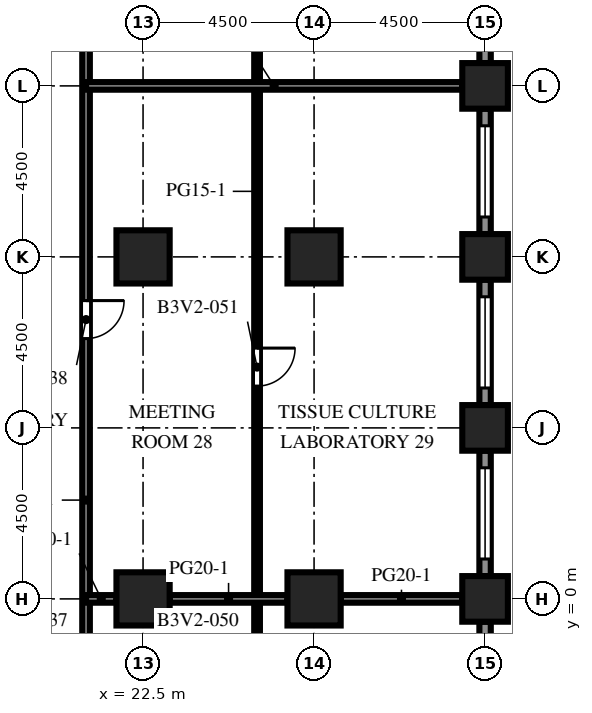
"""IFC4 building model, lengths in metres.
Left out: names, types, materials, properties, quantities, classifications, styles, units other than length and angle.
Written with IfcOpenShell. Run it as: python <this file> out.ifc"""

import sys

from ifc_helpers import new_model, si_unit, direction, frame, frame_2d, origin, origin_2d, place, context, subcontext, project, spatial, rectangle, extrude, element, fill, save


model = new_model("IFC4")
c1 = context("Model", 3, precision=1e-05, world=origin(), true_north=direction((0.0, 1.0)))
c2 = subcontext(c1, "Body", "Model", "MODEL_VIEW")
j1 = project(units=[si_unit("LENGTHUNIT", "METRE"), si_unit("PLANEANGLEUNIT", "RADIAN")], contexts=[c1])
p1 = place(None, origin())
s1 = spatial("IfcSite", under=j1, at=p1, CompositionType="ELEMENT")
p2 = place(p1, origin())
s2 = spatial("IfcBuilding", under=s1, at=p2, CompositionType="ELEMENT")
p3 = place(p2, frame((0.0, 0.0, 98.4)))
s3 = spatial("IfcBuildingStorey", under=s2, at=p3, CompositionType="ELEMENT", Elevation=98.4)
for number, where, z_axis, x_axis in (
    (1, (31.5, 0.0, 0.0), (0.0, 0.0, 1.0), (1.0, 0.0, 0.0)),
    (2, (31.5, 4.5, 0.0), (0.0, 0.0, 1.0), (1.0, 0.0, 0.0)),
    (3, (31.5, 9.0, 0.0), (0.0, 0.0, 1.0), (1.0, 0.0, 0.0)),
    (4, (31.5, 13.5, 0.0), (0.0, 0.0, 1.0), (1.0, 0.0, 0.0)),
):
    element("IfcColumn", number, at=place(p3, frame(where, z_axis=z_axis, x_axis=x_axis)), inside=s3, PredefinedType="COLUMN", context=c2, shape_type="SweptSolid", body=[
        extrude(rectangle(XDim=1.2, YDim=1.2, at=origin_2d()), origin(), (0.0, 0.0, 1.0), 4.1),
    ])
for number, where, z_axis, x_axis in (
    (5, (22.5, 0.0, 0.0), (0.0, 0.0, 1.0), (1.0, 0.0, 0.0)),
    (6, (22.5, 9.0, 0.0), (0.0, 0.0, 1.0), (1.0, 0.0, 0.0)),
    (7, (27.0, 0.0, 0.0), (0.0, 0.0, 1.0), (1.0, 0.0, 0.0)),
    (8, (27.0, 9.0, 0.0), (0.0, 0.0, 1.0), (1.0, 0.0, 0.0)),
):
    element("IfcColumn", number, at=place(p3, frame(where, z_axis=z_axis, x_axis=x_axis)), inside=s3, PredefinedType="COLUMN", context=c2, shape_type="SweptSolid", body=[
        extrude(rectangle(XDim=1.4, YDim=1.4, at=origin_2d()), origin(), (0.0, 0.0, 1.0), 4.1),
    ])
p4 = place(p3, frame((31.5, -0.6, 0.0), z_axis=(0.0, 0.0, 1.0), x_axis=(0.0, -1.0, 0.0)))
e9 = element("IfcWall", 9, at=p4, inside=s3, PredefinedType="SOLIDWALL", context=c2, shape_type="SweptSolid", body=[
    extrude(rectangle(XDim=3.3, YDim=0.3, at=frame_2d((1.65, 0.0))), origin(), (0.0, 0.0, 1.0), 2.75),
])
p5 = place(p4, frame((0.45, 0.0, 0.8)))
e10 = element("IfcOpeningElement", 10, at=p5, cuts=e9, PredefinedType="OPENING", context=c2, shape_type="SweptSolid", body=[
    extrude(rectangle(XDim=2.4, YDim=1.7, at=frame_2d((1.2, 0.85))), frame((0.0, 0.16, 0.0), z_axis=(0.0, -1.0, 0.0), x_axis=(1.0, 0.0, 0.0)), (0.0, 0.0, 1.0), 0.32),
])
p6 = place(p3, frame((31.5, 3.9, 0.0), z_axis=(0.0, 0.0, 1.0), x_axis=(0.0, -1.0, 0.0)))
e11 = element("IfcWall", 11, at=p6, inside=s3, PredefinedType="SOLIDWALL", context=c2, shape_type="SweptSolid", body=[
    extrude(rectangle(XDim=3.3, YDim=0.3, at=frame_2d((1.65, 0.0))), origin(), (0.0, 0.0, 1.0), 2.75),
])
p7 = place(p6, frame((0.45, 0.0, 0.8)))
e12 = element("IfcOpeningElement", 12, at=p7, cuts=e11, PredefinedType="OPENING", context=c2, shape_type="SweptSolid", body=[
    extrude(rectangle(XDim=2.4, YDim=1.7, at=frame_2d((1.2, 0.85))), frame((0.0, 0.16, 0.0), z_axis=(0.0, -1.0, 0.0), x_axis=(1.0, 0.0, 0.0)), (0.0, 0.0, 1.0), 0.32),
])
p8 = place(p3, frame((31.5, 8.4, 0.0), z_axis=(0.0, 0.0, 1.0), x_axis=(0.0, -1.0, 0.0)))
e13 = element("IfcWall", 13, at=p8, inside=s3, PredefinedType="SOLIDWALL", context=c2, shape_type="SweptSolid", body=[
    extrude(rectangle(XDim=3.3, YDim=0.3, at=frame_2d((1.65, 0.0))), origin(), (0.0, 0.0, 1.0), 2.75),
])
p9 = place(p8, frame((0.45, 0.0, 0.8)))
e14 = element("IfcOpeningElement", 14, at=p9, cuts=e13, PredefinedType="OPENING", context=c2, shape_type="SweptSolid", body=[
    extrude(rectangle(XDim=2.4, YDim=1.7, at=frame_2d((1.2, 0.85))), frame((0.0, 0.16, 0.0), z_axis=(0.0, -1.0, 0.0), x_axis=(1.0, 0.0, 0.0)), (0.0, 0.0, 1.0), 0.32),
])
p10 = place(p3, frame((31.5, 12.9, 0.0), z_axis=(0.0, 0.0, 1.0), x_axis=(0.0, -1.0, 0.0)))
e15 = element("IfcWall", 15, at=p10, inside=s3, PredefinedType="SOLIDWALL", context=c2, shape_type="SweptSolid", body=[
    extrude(rectangle(XDim=3.3, YDim=0.3, at=frame_2d((1.65, 0.0))), origin(), (0.0, 0.0, 1.0), 2.75),
])
p11 = place(p10, frame((0.45, 0.0, 0.8)))
e16 = element("IfcOpeningElement", 16, at=p11, cuts=e15, PredefinedType="OPENING", context=c2, shape_type="SweptSolid", body=[
    extrude(rectangle(XDim=2.4, YDim=1.7, at=frame_2d((1.2, 0.85))), frame((0.0, 0.16, 0.0), z_axis=(0.0, -1.0, 0.0), x_axis=(1.0, 0.0, 0.0)), (0.0, 0.0, 1.0), 0.32),
])
p12 = place(p3, frame((31.5, 17.4, 0.0), z_axis=(0.0, 0.0, 1.0), x_axis=(0.0, -1.0, 0.0)))
e17 = element("IfcWall", 17, at=p12, inside=s3, PredefinedType="SOLIDWALL", context=c2, shape_type="SweptSolid", body=[
    extrude(rectangle(XDim=3.3, YDim=0.3, at=frame_2d((1.65, 0.0))), origin(), (0.0, 0.0, 1.0), 2.75),
])
p13 = place(p12, frame((0.45, 0.0, 0.8)))
e18 = element("IfcOpeningElement", 18, at=p13, cuts=e17, PredefinedType="OPENING", context=c2, shape_type="SweptSolid", body=[
    extrude(rectangle(XDim=2.4, YDim=1.7, at=frame_2d((1.2, 0.85))), frame((0.0, 0.16, 0.0), z_axis=(0.0, -1.0, 0.0), x_axis=(1.0, 0.0, 0.0)), (0.0, 0.0, 1.0), 0.32),
])
p14 = place(p3, frame((21.0, 31.35, 0.0), z_axis=(0.0, 0.0, 1.0), x_axis=(0.0, -1.0, 0.0)))
e19 = element("IfcWall", 19, at=p14, inside=s3, PredefinedType="PARTITIONING", context=c2, shape_type="SweptSolid", body=[
    extrude(rectangle(XDim=53.7, YDim=0.2, at=frame_2d((26.85, 0.0))), origin(), (0.0, 0.0, 1.0), 3.65),
])
p15 = place(p14, frame((50.5, 0.0, 0.0)))
e20 = element("IfcOpeningElement", 20, at=p15, cuts=e19, PredefinedType="OPENING", context=c2, shape_type="SweptSolid", body=[
    extrude(rectangle(XDim=1.0, YDim=2.1, at=frame_2d((0.5, 1.05))), frame((0.0, 0.11, 0.0), z_axis=(0.0, -1.0, 0.0), x_axis=(1.0, 0.0, 0.0)), (0.0, 0.0, 1.0), 0.22),
])
p16 = place(p14, frame((46.5, 0.0, 0.0)))
e21 = element("IfcOpeningElement", 21, at=p16, cuts=e19, PredefinedType="OPENING", context=c2, shape_type="SweptSolid", body=[
    extrude(rectangle(XDim=1.0, YDim=2.1, at=frame_2d((0.5, 1.05))), frame((0.0, 0.11, 0.0), z_axis=(0.0, -1.0, 0.0), x_axis=(1.0, 0.0, 0.0)), (0.0, 0.0, 1.0), 0.22),
])
p17 = place(p14, frame((38.5, 0.0, 0.0)))
e22 = element("IfcOpeningElement", 22, at=p17, cuts=e19, PredefinedType="OPENING", context=c2, shape_type="SweptSolid", body=[
    extrude(rectangle(XDim=1.0, YDim=2.1, at=frame_2d((0.5, 1.05))), frame((0.0, 0.11, 0.0), z_axis=(0.0, -1.0, 0.0), x_axis=(1.0, 0.0, 0.0)), (0.0, 0.0, 1.0), 0.22),
])
p18 = place(p14, frame((33.0, 0.0, 0.0)))
e23 = element("IfcOpeningElement", 23, at=p18, cuts=e19, PredefinedType="OPENING", context=c2, shape_type="SweptSolid", body=[
    extrude(rectangle(XDim=1.0, YDim=2.1, at=frame_2d((0.5, 1.05))), frame((0.0, 0.11, 0.0), z_axis=(0.0, -1.0, 0.0), x_axis=(1.0, 0.0, 0.0)), (0.0, 0.0, 1.0), 0.22),
])
p19 = place(p14, frame((23.5, 0.0, 0.0)))
e24 = element("IfcOpeningElement", 24, at=p19, cuts=e19, PredefinedType="OPENING", context=c2, shape_type="SweptSolid", body=[
    extrude(rectangle(XDim=1.0, YDim=2.1, at=frame_2d((0.5, 1.05))), frame((0.0, 0.11, 0.0), z_axis=(0.0, -1.0, 0.0), x_axis=(1.0, 0.0, 0.0)), (0.0, 0.0, 1.0), 0.22),
])
p20 = place(p14, frame((15.75, 0.0, 0.0)))
e25 = element("IfcOpeningElement", 25, at=p20, cuts=e19, PredefinedType="OPENING", context=c2, shape_type="SweptSolid", body=[
    extrude(rectangle(XDim=1.0, YDim=2.1, at=frame_2d((0.5, 1.05))), frame((0.0, 0.11, 0.0), z_axis=(0.0, -1.0, 0.0), x_axis=(1.0, 0.0, 0.0)), (0.0, 0.0, 1.0), 0.22),
])
p21 = place(p14, frame((7.0, 0.0, 0.0)))
e26 = element("IfcOpeningElement", 26, at=p21, cuts=e19, PredefinedType="OPENING", context=c2, shape_type="SweptSolid", body=[
    extrude(rectangle(XDim=1.0, YDim=2.1, at=frame_2d((0.5, 1.05))), frame((0.0, 0.11, 0.0), z_axis=(0.0, -1.0, 0.0), x_axis=(1.0, 0.0, 0.0)), (0.0, 0.0, 1.0), 0.22),
])
p22 = place(p14, frame((1.0, 0.0, 0.0)))
e27 = element("IfcOpeningElement", 27, at=p22, cuts=e19, PredefinedType="OPENING", context=c2, shape_type="SweptSolid", body=[
    extrude(rectangle(XDim=1.0, YDim=2.1, at=frame_2d((0.5, 1.05))), frame((0.0, 0.11, 0.0), z_axis=(0.0, -1.0, 0.0), x_axis=(1.0, 0.0, 0.0)), (0.0, 0.0, 1.0), 0.22),
])
p23 = place(p3, frame((25.5, 31.35, 0.0), z_axis=(0.0, 0.0, 1.0), x_axis=(0.0, -1.0, 0.0)))
e28 = element("IfcWall", 28, at=p23, inside=s3, PredefinedType="PARTITIONING", context=c2, shape_type="SweptSolid", body=[
    extrude(rectangle(XDim=53.7, YDim=0.15, at=frame_2d((26.85, 0.0))), origin(), (0.0, 0.0, 1.0), 3.65),
])
p24 = place(p23, frame((50.5, 0.0, 0.0)))
e29 = element("IfcOpeningElement", 29, at=p24, cuts=e28, PredefinedType="OPENING", context=c2, shape_type="SweptSolid", body=[
    extrude(rectangle(XDim=1.0, YDim=2.1, at=frame_2d((0.5, 1.05))), frame((0.0, 0.085, 0.0), z_axis=(0.0, -1.0, 0.0), x_axis=(1.0, 0.0, 0.0)), (0.0, 0.0, 1.0), 0.17),
])
p25 = place(p23, frame((46.25, 0.0, 0.0)))
e30 = element("IfcOpeningElement", 30, at=p25, cuts=e28, PredefinedType="OPENING", context=c2, shape_type="SweptSolid", body=[
    extrude(rectangle(XDim=1.0, YDim=2.1, at=frame_2d((0.5, 1.05))), frame((0.0, 0.085, 0.0), z_axis=(0.0, -1.0, 0.0), x_axis=(1.0, 0.0, 0.0)), (0.0, 0.0, 1.0), 0.17),
])
p26 = place(p23, frame((38.5, 0.0, 0.0)))
e31 = element("IfcOpeningElement", 31, at=p26, cuts=e28, PredefinedType="OPENING", context=c2, shape_type="SweptSolid", body=[
    extrude(rectangle(XDim=1.0, YDim=2.1, at=frame_2d((0.5, 1.05))), frame((0.0, 0.085, 0.0), z_axis=(0.0, -1.0, 0.0), x_axis=(1.0, 0.0, 0.0)), (0.0, 0.0, 1.0), 0.17),
])
p27 = place(p23, frame((33.0, 0.0, 0.0)))
e32 = element("IfcOpeningElement", 32, at=p27, cuts=e28, PredefinedType="OPENING", context=c2, shape_type="SweptSolid", body=[
    extrude(rectangle(XDim=1.0, YDim=2.1, at=frame_2d((0.5, 1.05))), frame((0.0, 0.085, 0.0), z_axis=(0.0, -1.0, 0.0), x_axis=(1.0, 0.0, 0.0)), (0.0, 0.0, 1.0), 0.17),
])
p28 = place(p23, frame((24.75, 0.0, 0.0)))
e33 = element("IfcOpeningElement", 33, at=p28, cuts=e28, PredefinedType="OPENING", context=c2, shape_type="SweptSolid", body=[
    extrude(rectangle(XDim=1.0, YDim=2.1, at=frame_2d((0.5, 1.05))), frame((0.0, 0.085, 0.0), z_axis=(0.0, -1.0, 0.0), x_axis=(1.0, 0.0, 0.0)), (0.0, 0.0, 1.0), 0.17),
])
p29 = place(p23, frame((15.5, 0.0, 0.0)))
e34 = element("IfcOpeningElement", 34, at=p29, cuts=e28, PredefinedType="OPENING", context=c2, shape_type="SweptSolid", body=[
    extrude(rectangle(XDim=1.0, YDim=2.1, at=frame_2d((0.5, 1.05))), frame((0.0, 0.085, 0.0), z_axis=(0.0, -1.0, 0.0), x_axis=(1.0, 0.0, 0.0)), (0.0, 0.0, 1.0), 0.17),
])
p30 = place(p23, frame((9.75, 0.0, 0.0)))
e35 = element("IfcOpeningElement", 35, at=p30, cuts=e28, PredefinedType="OPENING", context=c2, shape_type="SweptSolid", body=[
    extrude(rectangle(XDim=1.0, YDim=2.1, at=frame_2d((0.5, 1.05))), frame((0.0, 0.085, 0.0), z_axis=(0.0, -1.0, 0.0), x_axis=(1.0, 0.0, 0.0)), (0.0, 0.0, 1.0), 0.17),
])
p31 = place(p23, frame((1.5, 0.0, 0.0)))
e36 = element("IfcOpeningElement", 36, at=p31, cuts=e28, PredefinedType="OPENING", context=c2, shape_type="SweptSolid", body=[
    extrude(rectangle(XDim=1.0, YDim=2.1, at=frame_2d((0.5, 1.05))), frame((0.0, 0.085, 0.0), z_axis=(0.0, -1.0, 0.0), x_axis=(1.0, 0.0, 0.0)), (0.0, 0.0, 1.0), 0.17),
])
p32 = place(p3, frame((21.0, 0.0, 0.0), z_axis=(0.0, 0.0, 1.0), x_axis=(1.0, 0.0, 0.0)))
e37 = element("IfcWall", 37, at=p32, inside=s3, PredefinedType="PARTITIONING", context=c2, shape_type="SweptSolid", body=[
    extrude(rectangle(XDim=0.8, YDim=0.2, at=frame_2d((0.4, 0.0))), origin(), (0.0, 0.0, 1.0), 3.65),
])
p33 = place(p3, frame((23.2, 0.0, 0.0), z_axis=(0.0, 0.0, 1.0), x_axis=(1.0, 0.0, 0.0)))
e38 = element("IfcWall", 38, at=p33, inside=s3, PredefinedType="PARTITIONING", context=c2, shape_type="SweptSolid", body=[
    extrude(rectangle(XDim=3.1, YDim=0.2, at=frame_2d((1.55, 0.0))), origin(), (0.0, 0.0, 1.0), 3.65),
])
p34 = place(p3, frame((27.7, 0.0, 0.0), z_axis=(0.0, 0.0, 1.0), x_axis=(1.0, 0.0, 0.0)))
e39 = element("IfcWall", 39, at=p34, inside=s3, PredefinedType="PARTITIONING", context=c2, shape_type="SweptSolid", body=[
    extrude(rectangle(XDim=3.2, YDim=0.2, at=frame_2d((1.6, 0.0))), origin(), (0.0, 0.0, 1.0), 3.65),
])
p35 = place(p3, frame((21.0, 13.5, 0.0), z_axis=(0.0, 0.0, 1.0), x_axis=(1.0, 0.0, 0.0)))
e40 = element("IfcWall", 40, at=p35, inside=s3, PredefinedType="PARTITIONING", context=c2, shape_type="SweptSolid", body=[
    extrude(rectangle(XDim=9.9, YDim=0.2, at=frame_2d((4.95, 0.0))), origin(), (0.0, 0.0, 1.0), 3.65),
])
p36 = place(p7, origin())
e41 = element("IfcWindow", 41, at=p36, inside=s3, PartitioningType="SINGLE_PANEL", PredefinedType="WINDOW", context=c2, shape_type="SweptSolid", body=[
    extrude(rectangle(XDim=2.4, YDim=1.7, at=frame_2d((1.2, 0.85))), frame((0.0, 0.03, 0.0), z_axis=(0.0, -1.0, 0.0), x_axis=(1.0, 0.0, 0.0)), (0.0, 0.0, 1.0), 0.06),
])
fill(e12, e41)
p37 = place(p9, origin())
e42 = element("IfcWindow", 42, at=p37, inside=s3, PartitioningType="SINGLE_PANEL", PredefinedType="WINDOW", context=c2, shape_type="SweptSolid", body=[
    extrude(rectangle(XDim=2.4, YDim=1.7, at=frame_2d((1.2, 0.85))), frame((0.0, 0.03, 0.0), z_axis=(0.0, -1.0, 0.0), x_axis=(1.0, 0.0, 0.0)), (0.0, 0.0, 1.0), 0.06),
])
fill(e14, e42)
p38 = place(p11, origin())
e43 = element("IfcWindow", 43, at=p38, inside=s3, PartitioningType="SINGLE_PANEL", PredefinedType="WINDOW", context=c2, shape_type="SweptSolid", body=[
    extrude(rectangle(XDim=2.4, YDim=1.7, at=frame_2d((1.2, 0.85))), frame((0.0, 0.03, 0.0), z_axis=(0.0, -1.0, 0.0), x_axis=(1.0, 0.0, 0.0)), (0.0, 0.0, 1.0), 0.06),
])
fill(e16, e43)
p39 = place(p19, origin())
e44 = element("IfcDoor", 44, at=p39, inside=s3, OperationType="SINGLE_SWING_LEFT", PredefinedType="DOOR", context=c2, shape_type="SweptSolid", body=[
    extrude(rectangle(XDim=1.0, YDim=2.1, at=frame_2d((0.5, 1.05))), frame((0.0, 0.025, 0.0), z_axis=(0.0, -1.0, 0.0), x_axis=(1.0, 0.0, 0.0)), (0.0, 0.0, 1.0), 0.05),
])
fill(e24, e44)
p40 = place(p28, origin())
e45 = element("IfcDoor", 45, at=p40, inside=s3, OperationType="SINGLE_SWING_LEFT", PredefinedType="DOOR", context=c2, shape_type="SweptSolid", body=[
    extrude(rectangle(XDim=1.0, YDim=2.1, at=frame_2d((0.5, 1.05))), frame((0.0, 0.025, 0.0), z_axis=(0.0, -1.0, 0.0), x_axis=(1.0, 0.0, 0.0)), (0.0, 0.0, 1.0), 0.05),
])
fill(e33, e45)
save(model, sys.argv[1])
